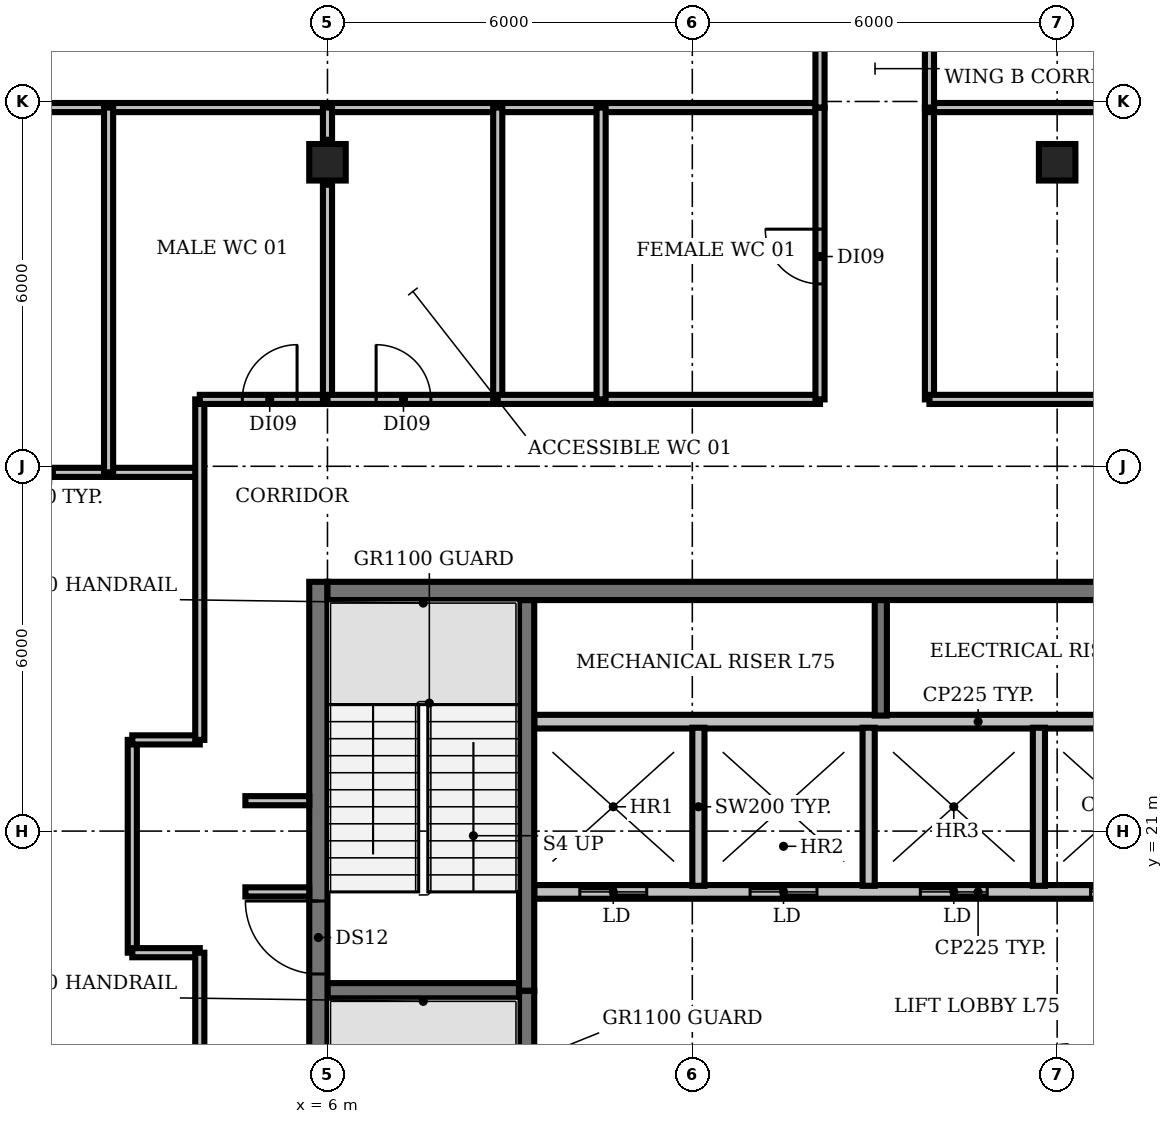
"""IFC4 building model, lengths in metres.
Left out: names, types, materials, properties, quantities, classifications, styles, units other than length and angle.
Written with IfcOpenShell. Run it as: python <this file> out.ifc"""

import sys

from ifc_helpers import new_model, si_unit, direction, frame, frame_2d, origin, origin_2d, place, context, subcontext, project, spatial, rectangle, extrude, element, fill, save


model = new_model("IFC4")
c1 = context("Model", 3, precision=1e-05, world=origin(), true_north=direction((0.0, 1.0)))
c2 = subcontext(c1, "Body", "Model", "MODEL_VIEW")
j1 = project(units=[si_unit("LENGTHUNIT", "METRE"), si_unit("PLANEANGLEUNIT", "RADIAN")], contexts=[c1])
p1 = place(None, origin())
s1 = spatial("IfcSite", under=j1, at=p1, CompositionType="ELEMENT")
p2 = place(p1, origin())
s2 = spatial("IfcBuilding", under=s1, at=p2, CompositionType="ELEMENT")
p3 = place(p2, frame((0.0, 0.0, 335.6)))
s3 = spatial("IfcBuildingStorey", under=s2, at=p3, CompositionType="ELEMENT", Elevation=335.6)
for number, where, z_axis, x_axis in (
    (1, (6.0, 32.0, 0.0), (0.0, 0.0, 1.0), (1.0, 0.0, 0.0)),
    (2, (18.0, 32.0, 0.0), (0.0, 0.0, 1.0), (1.0, 0.0, 0.0)),
):
    element("IfcColumn", number, at=place(p3, frame(where, z_axis=z_axis, x_axis=x_axis)), inside=s3, PredefinedType="COLUMN", context=c2, shape_type="SweptSolid", body=[
        extrude(rectangle(XDim=0.6, YDim=0.6, at=origin_2d()), origin(), (0.0, 0.0, 1.0), 3.9),
    ])
p4 = place(p3, frame((6.0, 18.375, 0.0), z_axis=(0.0, 0.0, 1.0), x_axis=(1.0, 0.0, 0.0)))
e3 = element("IfcWall", 3, at=p4, inside=s3, PredefinedType="SHEAR", context=c2, shape_type="SweptSolid", body=[
    extrude(rectangle(XDim=3.15, YDim=0.25, at=frame_2d((1.575, 0.0))), origin(), (0.0, 0.0, 1.0), 3.9),
])
p5 = place(p3, frame((24.0, 20.0, 0.0), z_axis=(0.0, 0.0, 1.0), x_axis=(-1.0, 0.0, 0.0)))
e4 = element("IfcWall", 4, at=p5, inside=s3, PredefinedType="PARTITIONING", context=c2, shape_type="SweptSolid", body=[
    extrude(rectangle(XDim=14.6, YDim=0.225, at=frame_2d((7.3, 0.0))), origin(), (0.0, 0.0, 1.0), 3.9),
])
p6 = place(p5, frame((12.75, 0.0, 0.0)))
e5 = element("IfcOpeningElement", 5, at=p6, cuts=e4, PredefinedType="OPENING", context=c2, shape_type="SweptSolid", body=[
    extrude(rectangle(XDim=1.1, YDim=2.1, at=frame_2d((0.55, 1.05))), frame((0.0, 0.123, 0.0), z_axis=(0.0, -1.0, 0.0), x_axis=(1.0, 0.0, 0.0)), (0.0, 0.0, 1.0), 0.245),
])
p7 = place(p5, frame((9.95, 0.0, 0.0)))
e6 = element("IfcOpeningElement", 6, at=p7, cuts=e4, PredefinedType="OPENING", context=c2, shape_type="SweptSolid", body=[
    extrude(rectangle(XDim=1.1, YDim=2.1, at=frame_2d((0.55, 1.05))), frame((0.0, 0.123, 0.0), z_axis=(0.0, -1.0, 0.0), x_axis=(1.0, 0.0, 0.0)), (0.0, 0.0, 1.0), 0.245),
])
p8 = place(p5, frame((7.15, 0.0, 0.0)))
e7 = element("IfcOpeningElement", 7, at=p8, cuts=e4, PredefinedType="OPENING", context=c2, shape_type="SweptSolid", body=[
    extrude(rectangle(XDim=1.1, YDim=2.1, at=frame_2d((0.55, 1.05))), frame((0.0, 0.123, 0.0), z_axis=(0.0, -1.0, 0.0), x_axis=(1.0, 0.0, 0.0)), (0.0, 0.0, 1.0), 0.245),
])
p9 = place(p5, frame((4.35, 0.0, 0.0)))
e8 = element("IfcOpeningElement", 8, at=p9, cuts=e4, PredefinedType="OPENING", context=c2, shape_type="SweptSolid", body=[
    extrude(rectangle(XDim=1.1, YDim=2.1, at=frame_2d((0.55, 1.05))), frame((0.0, 0.123, 0.0), z_axis=(0.0, -1.0, 0.0), x_axis=(1.0, 0.0, 0.0)), (0.0, 0.0, 1.0), 0.245),
])
p10 = place(p5, frame((2.137, 0.0, 0.0)))
e9 = element("IfcOpeningElement", 9, at=p10, cuts=e4, PredefinedType="OPENING", context=c2, shape_type="SweptSolid", body=[
    extrude(rectangle(XDim=0.9, YDim=2.1, at=frame_2d((0.45, 1.05))), frame((0.0, 0.123, 0.0), z_axis=(0.0, -1.0, 0.0), x_axis=(1.0, 0.0, 0.0)), (0.0, 0.0, 1.0), 0.245),
])
p11 = place(p5, frame((0.562, 0.0, 0.0)))
e10 = element("IfcOpeningElement", 10, at=p11, cuts=e4, PredefinedType="OPENING", context=c2, shape_type="SweptSolid", body=[
    extrude(rectangle(XDim=0.9, YDim=2.1, at=frame_2d((0.45, 1.05))), frame((0.0, 0.123, 0.0), z_axis=(0.0, -1.0, 0.0), x_axis=(1.0, 0.0, 0.0)), (0.0, 0.0, 1.0), 0.245),
])
p12 = place(p3, frame((9.4, 22.8, 0.0), z_axis=(0.0, 0.0, 1.0), x_axis=(1.0, 0.0, 0.0)))
e11 = element("IfcWall", 11, at=p12, inside=s3, PredefinedType="PARTITIONING", context=c2, shape_type="SweptSolid", body=[
    extrude(rectangle(XDim=14.6, YDim=0.225, at=frame_2d((7.3, 0.0))), origin(), (0.0, 0.0, 1.0), 3.9),
])
p13 = place(p3, frame((9.275, 18.375, 0.0), z_axis=(0.0, 0.0, 1.0), x_axis=(0.0, -1.0, 0.0)))
e12 = element("IfcWall", 12, at=p13, inside=s3, PredefinedType="SHEAR", context=c2, shape_type="SweptSolid", body=[
    extrude(rectangle(XDim=6.55, YDim=0.25, at=frame_2d((3.275, 0.0))), origin(), (0.0, 0.0, 1.0), 3.9),
])
p14 = place(p13, frame((5.075, 0.0, 0.0)))
e13 = element("IfcOpeningElement", 13, at=p14, cuts=e12, PredefinedType="OPENING", context=c2, shape_type="SweptSolid", body=[
    extrude(rectangle(XDim=1.0, YDim=2.1, at=frame_2d((0.5, 1.05))), frame((0.0, 0.135, 0.0), z_axis=(0.0, -1.0, 0.0), x_axis=(1.0, 0.0, 0.0)), (0.0, 0.0, 1.0), 0.27),
])
p15 = place(p3, frame((9.275, 18.375, 0.0), z_axis=(0.0, 0.0, 1.0), x_axis=(0.0, 1.0, 0.0)))
e14 = element("IfcWall", 14, at=p15, inside=s3, PredefinedType="SHEAR", context=c2, shape_type="SweptSolid", body=[
    extrude(rectangle(XDim=6.425, YDim=0.25, at=frame_2d((3.212, 0.0))), origin(), (0.0, 0.0, 1.0), 3.9),
])
for number, where, z_axis, x_axis in (
    (15, (12.1, 20.1, 0.0), (0.0, 0.0, 1.0), (0.0, 1.0, 0.0)),
    (16, (14.9, 20.1, 0.0), (0.0, 0.0, 1.0), (0.0, 1.0, 0.0)),
):
    element("IfcWall", number, at=place(p3, frame(where, z_axis=z_axis, x_axis=x_axis)), inside=s3, PredefinedType="SOLIDWALL", context=c2, shape_type="SweptSolid", body=[
        extrude(rectangle(XDim=2.6, YDim=0.2, at=frame_2d((1.3, 0.0))), origin(), (0.0, 0.0, 1.0), 3.9),
    ])
p16 = place(p3, frame((15.1, 22.9, 0.0), z_axis=(0.0, 0.0, 1.0), x_axis=(0.0, 1.0, 0.0)))
e17 = element("IfcWall", 17, at=p16, inside=s3, PredefinedType="SHEAR", context=c2, shape_type="SweptSolid", body=[
    extrude(rectangle(XDim=1.9, YDim=0.2, at=frame_2d((0.95, 0.0))), origin(), (0.0, 0.0, 1.0), 3.9),
])
p17 = place(p3, frame((17.7, 20.1, 0.0), z_axis=(0.0, 0.0, 1.0), x_axis=(0.0, 1.0, 0.0)))
e18 = element("IfcWall", 18, at=p17, inside=s3, PredefinedType="SOLIDWALL", context=c2, shape_type="SweptSolid", body=[
    extrude(rectangle(XDim=2.6, YDim=0.2, at=frame_2d((1.3, 0.0))), origin(), (0.0, 0.0, 1.0), 3.9),
])
p18 = place(p3, frame((5.85, 5.1, 0.0), z_axis=(0.0, 0.0, 1.0), x_axis=(0.0, 1.0, 0.0)))
e19 = element("IfcWall", 19, at=p18, inside=s3, PredefinedType="SHEAR", context=c2, shape_type="SweptSolid", body=[
    extrude(rectangle(XDim=20.0, YDim=0.3, at=frame_2d((10.0, 0.0))), origin(), (0.0, 0.0, 1.0), 3.9),
])
p19 = place(p18, frame((0.55, 0.0, 0.0)))
e20 = element("IfcOpeningElement", 20, at=p19, cuts=e19, PredefinedType="OPENING", context=c2, shape_type="SweptSolid", body=[
    extrude(rectangle(XDim=1.5, YDim=2.1, at=frame_2d((0.75, 1.05))), frame((0.0, 0.16, 0.0), z_axis=(0.0, -1.0, 0.0), x_axis=(1.0, 0.0, 0.0)), (0.0, 0.0, 1.0), 0.32),
])
p20 = place(p18, frame((7.0, 0.0, 0.0)))
e21 = element("IfcOpeningElement", 21, at=p20, cuts=e19, PredefinedType="OPENING", context=c2, shape_type="SweptSolid", body=[
    extrude(rectangle(XDim=1.2, YDim=2.1, at=frame_2d((0.6, 1.05))), frame((0.0, 0.16, 0.0), z_axis=(0.0, -1.0, 0.0), x_axis=(1.0, 0.0, 0.0)), (0.0, 0.0, 1.0), 0.32),
])
p21 = place(p18, frame((13.55, 0.0, 0.0)))
e22 = element("IfcOpeningElement", 22, at=p21, cuts=e19, PredefinedType="OPENING", context=c2, shape_type="SweptSolid", body=[
    extrude(rectangle(XDim=1.2, YDim=2.1, at=frame_2d((0.6, 1.05))), frame((0.0, 0.16, 0.0), z_axis=(0.0, -1.0, 0.0), x_axis=(1.0, 0.0, 0.0)), (0.0, 0.0, 1.0), 0.32),
])
p22 = place(p3, frame((6.0, 24.95, 0.0), z_axis=(0.0, 0.0, 1.0), x_axis=(1.0, 0.0, 0.0)))
e23 = element("IfcWall", 23, at=p22, inside=s3, PredefinedType="SHEAR", context=c2, shape_type="SweptSolid", body=[
    extrude(rectangle(XDim=18.0, YDim=0.3, at=frame_2d((9.0, 0.0))), origin(), (0.0, 0.0, 1.0), 3.9),
])
p23 = place(p3, frame((-0.98, 26.9, 0.0), z_axis=(0.0, 0.0, 1.0), x_axis=(1.0, 0.0, 0.0)))
e24 = element("IfcWall", 24, at=p23, inside=s3, PredefinedType="PARTITIONING", context=c2, shape_type="SweptSolid", body=[
    extrude(rectangle(XDim=4.88, YDim=0.15, at=frame_2d((2.44, 0.0))), origin(), (0.0, 0.0, 1.0), 2.95),
])
p24 = place(p3, frame((-0.98, 32.9, 0.0), z_axis=(0.0, 0.0, 1.0), x_axis=(1.0, 0.0, 0.0)))
e25 = element("IfcWall", 25, at=p24, inside=s3, PredefinedType="PARTITIONING", context=c2, shape_type="SweptSolid", body=[
    extrude(rectangle(XDim=15.08, YDim=0.15, at=frame_2d((7.54, 0.0))), origin(), (0.0, 0.0, 1.0), 2.95),
])
p25 = place(p3, frame((2.4, 26.9, 0.0), z_axis=(0.0, 0.0, 1.0), x_axis=(0.0, 1.0, 0.0)))
e26 = element("IfcWall", 26, at=p25, inside=s3, PredefinedType="PARTITIONING", context=c2, shape_type="SweptSolid", body=[
    extrude(rectangle(XDim=6.0, YDim=0.15, at=frame_2d((3.0, 0.0))), origin(), (0.0, 0.0, 1.0), 2.95),
])
p26 = place(p3, frame((2.79, 19.0, 0.0), z_axis=(0.0, 0.0, 1.0), x_axis=(0.0, 1.0, 0.0)))
e27 = element("IfcWall", 27, at=p26, inside=s3, PredefinedType="PARTITIONING", context=c2, shape_type="SweptSolid", body=[
    extrude(rectangle(XDim=3.5, YDim=0.15, at=frame_2d((1.75, 0.0))), origin(), (0.0, 0.0, 1.0), 2.95),
])
for number, where, z_axis, x_axis in (
    (28, (2.79, 19.0, 0.0), (0.0, 0.0, 1.0), (1.0, 0.0, 0.0)),
    (29, (2.79, 22.5, 0.0), (0.0, 0.0, 1.0), (1.0, 0.0, 0.0)),
):
    element("IfcWall", number, at=place(p3, frame(where, z_axis=z_axis, x_axis=x_axis)), inside=s3, PredefinedType="PARTITIONING", context=c2, shape_type="SweptSolid", body=[
        extrude(rectangle(XDim=1.11, YDim=0.15, at=frame_2d((0.555, 0.0))), origin(), (0.0, 0.0, 1.0), 2.95),
    ])
p27 = place(p3, frame((3.9, 5.1, 0.0), z_axis=(0.0, 0.0, 1.0), x_axis=(0.0, 1.0, 0.0)))
e30 = element("IfcWall", 30, at=p27, inside=s3, PredefinedType="PARTITIONING", context=c2, shape_type="SweptSolid", body=[
    extrude(rectangle(XDim=13.9, YDim=0.15, at=frame_2d((6.95, 0.0))), origin(), (0.0, 0.0, 1.0), 2.95),
])
p28 = place(p27, frame((6.2, 0.0, 0.0)))
e31 = element("IfcOpeningElement", 31, at=p28, cuts=e30, PredefinedType="OPENING", context=c2, shape_type="SweptSolid", body=[
    extrude(rectangle(XDim=1.2, YDim=2.1, at=frame_2d((0.6, 1.05))), frame((0.0, 0.085, 0.0), z_axis=(0.0, -1.0, 0.0), x_axis=(1.0, 0.0, 0.0)), (0.0, 0.0, 1.0), 0.17),
])
p29 = place(p3, frame((3.9, 22.5, 0.0), z_axis=(0.0, 0.0, 1.0), x_axis=(0.0, 1.0, 0.0)))
e32 = element("IfcWall", 32, at=p29, inside=s3, PredefinedType="PARTITIONING", context=c2, shape_type="SweptSolid", body=[
    extrude(rectangle(XDim=5.6, YDim=0.15, at=frame_2d((2.8, 0.0))), origin(), (0.0, 0.0, 1.0), 2.95),
])
p30 = place(p3, frame((3.9, 28.1, 0.0), z_axis=(0.0, 0.0, 1.0), x_axis=(1.0, 0.0, 0.0)))
e33 = element("IfcWall", 33, at=p30, inside=s3, PredefinedType="PARTITIONING", context=c2, shape_type="SweptSolid", body=[
    extrude(rectangle(XDim=2.1, YDim=0.15, at=frame_2d((1.05, 0.0))), origin(), (0.0, 0.0, 1.0), 2.95),
])
p31 = place(p30, frame((0.7, 0.0, 0.0)))
e34 = element("IfcOpeningElement", 34, at=p31, cuts=e33, PredefinedType="OPENING", context=c2, shape_type="SweptSolid", body=[
    extrude(rectangle(XDim=0.9, YDim=2.1, at=frame_2d((0.45, 1.05))), frame((0.0, 0.085, 0.0), z_axis=(0.0, -1.0, 0.0), x_axis=(1.0, 0.0, 0.0)), (0.0, 0.0, 1.0), 0.17),
])
for number, where, z_axis, x_axis in (
    (35, (4.65, 20.0, 0.0), (0.0, 0.0, 1.0), (1.0, 0.0, 0.0)),
    (36, (4.65, 21.5, 0.0), (0.0, 0.0, 1.0), (1.0, 0.0, 0.0)),
):
    element("IfcWall", number, at=place(p3, frame(where, z_axis=z_axis, x_axis=x_axis)), inside=s3, PredefinedType="PARTITIONING", context=c2, shape_type="SweptSolid", body=[
        extrude(rectangle(XDim=1.05, YDim=0.15, at=frame_2d((0.525, 0.0))), origin(), (0.0, 0.0, 1.0), 2.95),
    ])
p32 = place(p3, frame((6.0, 28.1, 0.0), z_axis=(0.0, 0.0, 1.0), x_axis=(0.0, 1.0, 0.0)))
e37 = element("IfcWall", 37, at=p32, inside=s3, PredefinedType="PARTITIONING", context=c2, shape_type="SweptSolid", body=[
    extrude(rectangle(XDim=3.53, YDim=0.15, at=frame_2d((1.765, 0.0))), origin(), (0.0, 0.0, 1.0), 2.95),
])
p33 = place(p3, frame((6.0, 28.1, 0.0), z_axis=(0.0, 0.0, 1.0), x_axis=(1.0, 0.0, 0.0)))
e38 = element("IfcWall", 38, at=p33, inside=s3, PredefinedType="PARTITIONING", context=c2, shape_type="SweptSolid", body=[
    extrude(rectangle(XDim=2.8, YDim=0.15, at=frame_2d((1.4, 0.0))), origin(), (0.0, 0.0, 1.0), 2.95),
])
p34 = place(p33, frame((0.8, 0.0, 0.0)))
e39 = element("IfcOpeningElement", 39, at=p34, cuts=e38, PredefinedType="OPENING", context=c2, shape_type="SweptSolid", body=[
    extrude(rectangle(XDim=0.9, YDim=2.1, at=frame_2d((0.45, 1.05))), frame((0.0, 0.085, 0.0), z_axis=(0.0, -1.0, 0.0), x_axis=(1.0, 0.0, 0.0)), (0.0, 0.0, 1.0), 0.17),
])
p35 = place(p3, frame((6.0, 31.736, 0.0), z_axis=(0.0, 0.0, 1.0), x_axis=(0.0, 1.0, 0.0)))
e40 = element("IfcWall", 40, at=p35, inside=s3, PredefinedType="PARTITIONING", context=c2, shape_type="SweptSolid", body=[
    extrude(rectangle(XDim=0.529, YDim=0.15, at=frame_2d((0.264, 0.0))), origin(), (0.0, 0.0, 1.0), 2.95),
])
p36 = place(p3, frame((6.0, 32.37, 0.0), z_axis=(0.0, 0.0, 1.0), x_axis=(0.0, 1.0, 0.0)))
e41 = element("IfcWall", 41, at=p36, inside=s3, PredefinedType="PARTITIONING", context=c2, shape_type="SweptSolid", body=[
    extrude(rectangle(XDim=0.53, YDim=0.15, at=frame_2d((0.265, 0.0))), origin(), (0.0, 0.0, 1.0), 2.95),
])
p37 = place(p3, frame((8.8, 28.1, 0.0), z_axis=(0.0, 0.0, 1.0), x_axis=(0.0, 1.0, 0.0)))
e42 = element("IfcWall", 42, at=p37, inside=s3, PredefinedType="PARTITIONING", context=c2, shape_type="SweptSolid", body=[
    extrude(rectangle(XDim=4.8, YDim=0.15, at=frame_2d((2.4, 0.0))), origin(), (0.0, 0.0, 1.0), 2.95),
])
p38 = place(p3, frame((8.8, 28.1, 0.0), z_axis=(0.0, 0.0, 1.0), x_axis=(1.0, 0.0, 0.0)))
e43 = element("IfcWall", 43, at=p38, inside=s3, PredefinedType="PARTITIONING", context=c2, shape_type="SweptSolid", body=[
    extrude(rectangle(XDim=5.3, YDim=0.15, at=frame_2d((2.65, 0.0))), origin(), (0.0, 0.0, 1.0), 2.95),
])
p39 = place(p3, frame((10.5, 28.1, 0.0), z_axis=(0.0, 0.0, 1.0), x_axis=(0.0, 1.0, 0.0)))
e44 = element("IfcWall", 44, at=p39, inside=s3, PredefinedType="PARTITIONING", context=c2, shape_type="SweptSolid", body=[
    extrude(rectangle(XDim=4.8, YDim=0.15, at=frame_2d((2.4, 0.0))), origin(), (0.0, 0.0, 1.0), 2.95),
])
p40 = place(p3, frame((14.1, 28.1, 0.0), z_axis=(0.0, 0.0, 1.0), x_axis=(0.0, 1.0, 0.0)))
e45 = element("IfcWall", 45, at=p40, inside=s3, PredefinedType="PARTITIONING", context=c2, shape_type="SweptSolid", body=[
    extrude(rectangle(XDim=4.8, YDim=0.15, at=frame_2d((2.4, 0.0))), origin(), (0.0, 0.0, 1.0), 2.95),
])
p41 = place(p40, frame((1.9, 0.0, 0.0)))
e46 = element("IfcOpeningElement", 46, at=p41, cuts=e45, PredefinedType="OPENING", context=c2, shape_type="SweptSolid", body=[
    extrude(rectangle(XDim=0.9, YDim=2.1, at=frame_2d((0.45, 1.05))), frame((0.0, 0.085, 0.0), z_axis=(0.0, -1.0, 0.0), x_axis=(1.0, 0.0, 0.0)), (0.0, 0.0, 1.0), 0.17),
])
p42 = place(p3, frame((14.1, 32.9, 0.0), z_axis=(0.0, 0.0, 1.0), x_axis=(0.0, 1.0, 0.0)))
e47 = element("IfcWall", 47, at=p42, inside=s3, PredefinedType="PARTITIONING", context=c2, shape_type="SweptSolid", body=[
    extrude(rectangle(XDim=6.08, YDim=0.15, at=frame_2d((3.04, 0.0))), origin(), (0.0, 0.0, 1.0), 2.95),
])
p43 = place(p42, frame((2.48, 0.0, 0.0)))
e48 = element("IfcOpeningElement", 48, at=p43, cuts=e47, PredefinedType="OPENING", context=c2, shape_type="SweptSolid", body=[
    extrude(rectangle(XDim=1.0, YDim=2.1, at=frame_2d((0.5, 1.05))), frame((0.0, 0.085, 0.0), z_axis=(0.0, -1.0, 0.0), x_axis=(1.0, 0.0, 0.0)), (0.0, 0.0, 1.0), 0.17),
])
p44 = place(p3, frame((15.9, 28.1, 0.0), z_axis=(0.0, 0.0, 1.0), x_axis=(0.0, 1.0, 0.0)))
e49 = element("IfcWall", 49, at=p44, inside=s3, PredefinedType="PARTITIONING", context=c2, shape_type="SweptSolid", body=[
    extrude(rectangle(XDim=4.8, YDim=0.15, at=frame_2d((2.4, 0.0))), origin(), (0.0, 0.0, 1.0), 2.95),
])
p45 = place(p3, frame((15.9, 28.1, 0.0), z_axis=(0.0, 0.0, 1.0), x_axis=(1.0, 0.0, 0.0)))
e50 = element("IfcWall", 50, at=p45, inside=s3, PredefinedType="PARTITIONING", context=c2, shape_type="SweptSolid", body=[
    extrude(rectangle(XDim=5.62, YDim=0.15, at=frame_2d((2.81, 0.0))), origin(), (0.0, 0.0, 1.0), 2.95),
])
p46 = place(p3, frame((15.9, 32.9, 0.0), z_axis=(0.0, 0.0, 1.0), x_axis=(1.0, 0.0, 0.0)))
e51 = element("IfcWall", 51, at=p46, inside=s3, PredefinedType="PARTITIONING", context=c2, shape_type="SweptSolid", body=[
    extrude(rectangle(XDim=9.22, YDim=0.15, at=frame_2d((4.61, 0.0))), origin(), (0.0, 0.0, 1.0), 2.95),
])
p47 = place(p3, frame((15.9, 38.97, 0.0), z_axis=(0.0, 0.0, 1.0), x_axis=(0.0, -1.0, 0.0)))
e52 = element("IfcWall", 52, at=p47, inside=s3, PredefinedType="PARTITIONING", context=c2, shape_type="SweptSolid", body=[
    extrude(rectangle(XDim=6.07, YDim=0.15, at=frame_2d((3.035, 0.0))), origin(), (0.0, 0.0, 1.0), 2.95),
])
p48 = place(p47, frame((2.57, 0.0, 0.0)))
e53 = element("IfcOpeningElement", 53, at=p48, cuts=e52, PredefinedType="OPENING", context=c2, shape_type="SweptSolid", body=[
    extrude(rectangle(XDim=1.2, YDim=2.1, at=frame_2d((0.6, 1.05))), frame((0.0, 0.085, 0.0), z_axis=(0.0, -1.0, 0.0), x_axis=(1.0, 0.0, 0.0)), (0.0, 0.0, 1.0), 0.17),
])
p49 = place(p6, origin())
e54 = element("IfcDoor", 54, at=p49, inside=s3, OperationType="DOUBLE_DOOR_SLIDING", PredefinedType="DOOR", context=c2, shape_type="SweptSolid", body=[
    extrude(rectangle(XDim=1.1, YDim=2.1, at=frame_2d((0.55, 1.05))), frame((0.0, 0.025, 0.0), z_axis=(0.0, -1.0, 0.0), x_axis=(1.0, 0.0, 0.0)), (0.0, 0.0, 1.0), 0.05),
])
fill(e5, e54)
p50 = place(p7, origin())
e55 = element("IfcDoor", 55, at=p50, inside=s3, OperationType="DOUBLE_DOOR_SLIDING", PredefinedType="DOOR", context=c2, shape_type="SweptSolid", body=[
    extrude(rectangle(XDim=1.1, YDim=2.1, at=frame_2d((0.55, 1.05))), frame((0.0, 0.025, 0.0), z_axis=(0.0, -1.0, 0.0), x_axis=(1.0, 0.0, 0.0)), (0.0, 0.0, 1.0), 0.05),
])
fill(e6, e55)
p51 = place(p8, origin())
e56 = element("IfcDoor", 56, at=p51, inside=s3, OperationType="DOUBLE_DOOR_SLIDING", PredefinedType="DOOR", context=c2, shape_type="SweptSolid", body=[
    extrude(rectangle(XDim=1.1, YDim=2.1, at=frame_2d((0.55, 1.05))), frame((0.0, 0.025, 0.0), z_axis=(0.0, -1.0, 0.0), x_axis=(1.0, 0.0, 0.0)), (0.0, 0.0, 1.0), 0.05),
])
fill(e7, e56)
p52 = place(p9, origin())
e57 = element("IfcDoor", 57, at=p52, inside=s3, OperationType="DOUBLE_DOOR_SLIDING", PredefinedType="DOOR", context=c2, shape_type="SweptSolid", body=[
    extrude(rectangle(XDim=1.1, YDim=2.1, at=frame_2d((0.55, 1.05))), frame((0.0, 0.025, 0.0), z_axis=(0.0, -1.0, 0.0), x_axis=(1.0, 0.0, 0.0)), (0.0, 0.0, 1.0), 0.05),
])
fill(e8, e57)
p53 = place(p21, origin())
e58 = element("IfcDoor", 58, at=p53, inside=s3, OperationType="SINGLE_SWING_RIGHT", PredefinedType="DOOR", context=c2, shape_type="SweptSolid", body=[
    extrude(rectangle(XDim=1.2, YDim=2.1, at=frame_2d((0.6, 1.05))), frame((0.0, 0.025, 0.0), z_axis=(0.0, -1.0, 0.0), x_axis=(1.0, 0.0, 0.0)), (0.0, 0.0, 1.0), 0.05),
])
fill(e22, e58)
p54 = place(p31, origin())
e59 = element("IfcDoor", 59, at=p54, inside=s3, OperationType="SINGLE_SWING_RIGHT", PredefinedType="DOOR", context=c2, shape_type="SweptSolid", body=[
    extrude(rectangle(XDim=0.9, YDim=2.1, at=frame_2d((0.45, 1.05))), frame((0.0, 0.025, 0.0), z_axis=(0.0, -1.0, 0.0), x_axis=(1.0, 0.0, 0.0)), (0.0, 0.0, 1.0), 0.05),
])
fill(e34, e59)
p55 = place(p34, origin())
e60 = element("IfcDoor", 60, at=p55, inside=s3, OperationType="SINGLE_SWING_LEFT", PredefinedType="DOOR", context=c2, shape_type="SweptSolid", body=[
    extrude(rectangle(XDim=0.9, YDim=2.1, at=frame_2d((0.45, 1.05))), frame((0.0, 0.025, 0.0), z_axis=(0.0, -1.0, 0.0), x_axis=(1.0, 0.0, 0.0)), (0.0, 0.0, 1.0), 0.05),
])
fill(e39, e60)
p56 = place(p41, origin())
e61 = element("IfcDoor", 61, at=p56, inside=s3, OperationType="SINGLE_SWING_RIGHT", PredefinedType="DOOR", context=c2, shape_type="SweptSolid", body=[
    extrude(rectangle(XDim=0.9, YDim=2.1, at=frame_2d((0.45, 1.05))), frame((0.0, 0.025, 0.0), z_axis=(0.0, -1.0, 0.0), x_axis=(1.0, 0.0, 0.0)), (0.0, 0.0, 1.0), 0.05),
])
fill(e46, e61)
save(model, sys.argv[1])
